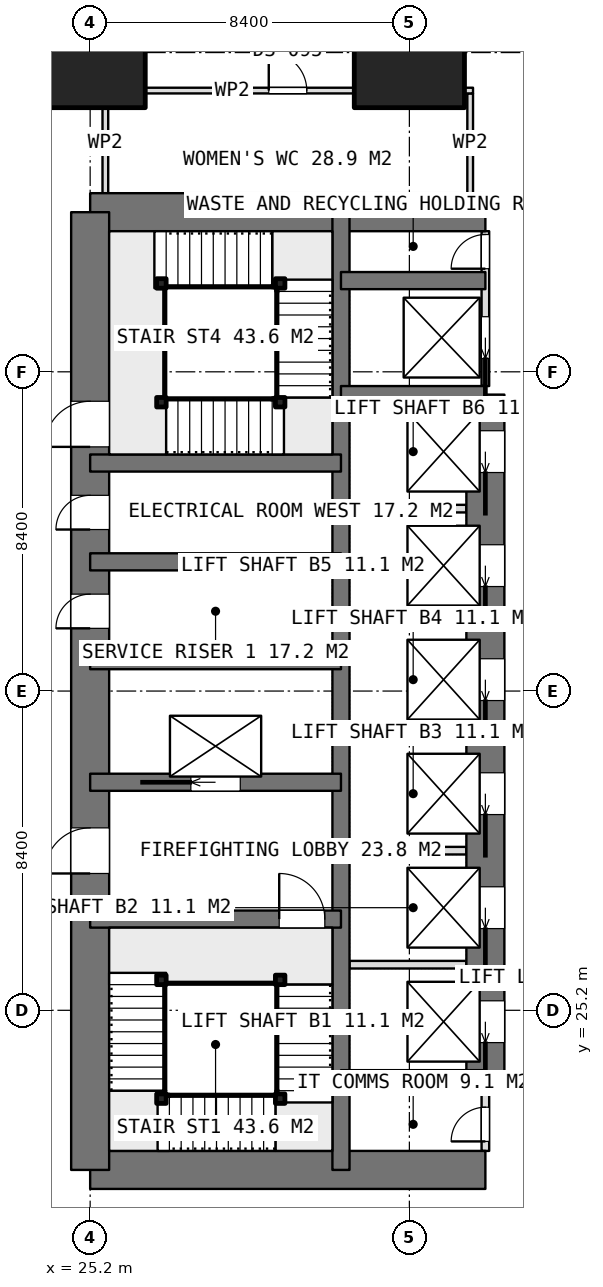
"""IFC4 building model, lengths in metres.
Left out: names, types, materials, properties, quantities, classifications, styles, units other than length and angle.
Written with IfcOpenShell. Run it as: python <this file> out.ifc"""

import sys

from ifc_helpers import new_model, si_unit, direction, frame, frame_2d, origin, origin_2d, place, context, subcontext, project, spatial, rectangle, extrude, element, fill, save


model = new_model("IFC4")
c1 = context("Model", 3, precision=1e-05, world=origin(), true_north=direction((0.0, 1.0)))
c2 = subcontext(c1, "Body", "Model", "MODEL_VIEW")
j1 = project(units=[si_unit("LENGTHUNIT", "METRE"), si_unit("PLANEANGLEUNIT", "RADIAN")], contexts=[c1])
p1 = place(None, origin())
s1 = spatial("IfcSite", under=j1, at=p1, CompositionType="ELEMENT")
p2 = place(p1, origin())
s2 = spatial("IfcBuilding", under=s1, at=p2, CompositionType="ELEMENT")
p3 = place(p2, frame((0.0, 0.0, 90.8)))
s3 = spatial("IfcBuildingStorey", under=s2, at=p3, CompositionType="ELEMENT", Elevation=90.8)
for number, where, z_axis, x_axis in (
    (1, (25.2, 21.0, 0.0), (0.0, 0.0, 1.0), (1.0, 0.0, 0.0)),
    (2, (25.2, 46.2, 0.0), (0.0, 0.0, 1.0), (1.0, 0.0, 0.0)),
):
    element("IfcWall", number, at=place(p3, frame(where, z_axis=z_axis, x_axis=x_axis)), inside=s3, PredefinedType="SHEAR", context=c2, shape_type="SweptSolid", body=[
        extrude(rectangle(XDim=10.4, YDim=1.0, at=frame_2d((5.2, 0.0))), origin(), (0.0, 0.0, 1.0), 4.5),
    ])
p4 = place(p3, frame((25.2, 21.0, 0.0), z_axis=(0.0, 0.0, 1.0), x_axis=(0.0, 1.0, 0.0)))
e3 = element("IfcWall", 3, at=p4, inside=s3, PredefinedType="SHEAR", context=c2, shape_type="SweptSolid", body=[
    extrude(rectangle(XDim=25.2, YDim=1.0, at=frame_2d((12.6, 0.0))), origin(), (0.0, 0.0, 1.0), 4.5),
])
p5 = place(p4, frame((7.8, 0.0, 0.0)))
e4 = element("IfcOpeningElement", 4, at=p5, cuts=e3, PredefinedType="OPENING", context=c2, shape_type="SweptSolid", body=[
    extrude(rectangle(XDim=1.2, YDim=2.1, at=frame_2d((0.6, 1.05))), frame((0.0, 0.51, 0.0), z_axis=(0.0, -1.0, 0.0), x_axis=(1.0, 0.0, 0.0)), (0.0, 0.0, 1.0), 1.02),
])
p6 = place(p4, frame((14.25, 0.0, 0.0)))
e5 = element("IfcOpeningElement", 5, at=p6, cuts=e3, PredefinedType="OPENING", context=c2, shape_type="SweptSolid", body=[
    extrude(rectangle(XDim=0.9, YDim=2.1, at=frame_2d((0.45, 1.05))), frame((0.0, 0.51, 0.0), z_axis=(0.0, -1.0, 0.0), x_axis=(1.0, 0.0, 0.0)), (0.0, 0.0, 1.0), 1.02),
])
p7 = place(p4, frame((16.85, 0.0, 0.0)))
e6 = element("IfcOpeningElement", 6, at=p7, cuts=e3, PredefinedType="OPENING", context=c2, shape_type="SweptSolid", body=[
    extrude(rectangle(XDim=0.9, YDim=2.1, at=frame_2d((0.45, 1.05))), frame((0.0, 0.51, 0.0), z_axis=(0.0, -1.0, 0.0), x_axis=(1.0, 0.0, 0.0)), (0.0, 0.0, 1.0), 1.02),
])
p8 = place(p4, frame((19.025, 0.0, 0.0)))
e7 = element("IfcOpeningElement", 7, at=p8, cuts=e3, PredefinedType="OPENING", context=c2, shape_type="SweptSolid", body=[
    extrude(rectangle(XDim=1.2, YDim=2.1, at=frame_2d((0.6, 1.05))), frame((0.0, 0.51, 0.0), z_axis=(0.0, -1.0, 0.0), x_axis=(1.0, 0.0, 0.0)), (0.0, 0.0, 1.0), 1.02),
])
p9 = place(p3, frame((31.8, 21.0, 0.0), z_axis=(0.0, 0.0, 1.0), x_axis=(0.0, 1.0, 0.0)))
e8 = element("IfcWall", 8, at=p9, inside=s3, PredefinedType="SHEAR", context=c2, shape_type="SweptSolid", body=[
    extrude(rectangle(XDim=25.2, YDim=0.45, at=frame_2d((12.6, 0.0))), origin(), (0.0, 0.0, 1.0), 4.5),
])
p10 = place(p3, frame((35.6, 23.4, 0.0), z_axis=(0.0, 0.0, 1.0), x_axis=(0.0, 1.0, 0.0)))
e9 = element("IfcWall", 9, at=p10, inside=s3, PredefinedType="SHEAR", context=c2, shape_type="SweptSolid", body=[
    extrude(rectangle(XDim=18.0, YDim=1.0, at=frame_2d((9.0, 0.0))), origin(), (0.0, 0.0, 1.0), 4.5),
])
p11 = place(p10, frame((0.95, 0.0, 0.0)))
e10 = element("IfcOpeningElement", 10, at=p11, cuts=e9, PredefinedType="OPENING", context=c2, shape_type="SweptSolid", body=[
    extrude(rectangle(XDim=1.1, YDim=2.1, at=frame_2d((0.55, 1.05))), frame((0.0, 0.51, 0.0), z_axis=(0.0, -1.0, 0.0), x_axis=(1.0, 0.0, 0.0)), (0.0, 0.0, 1.0), 1.02),
])
p12 = place(p10, frame((3.95, 0.0, 0.0)))
e11 = element("IfcOpeningElement", 11, at=p12, cuts=e9, PredefinedType="OPENING", context=c2, shape_type="SweptSolid", body=[
    extrude(rectangle(XDim=1.1, YDim=2.1, at=frame_2d((0.55, 1.05))), frame((0.0, 0.51, 0.0), z_axis=(0.0, -1.0, 0.0), x_axis=(1.0, 0.0, 0.0)), (0.0, 0.0, 1.0), 1.02),
])
p13 = place(p10, frame((6.95, 0.0, 0.0)))
e12 = element("IfcOpeningElement", 12, at=p13, cuts=e9, PredefinedType="OPENING", context=c2, shape_type="SweptSolid", body=[
    extrude(rectangle(XDim=1.1, YDim=2.1, at=frame_2d((0.55, 1.05))), frame((0.0, 0.51, 0.0), z_axis=(0.0, -1.0, 0.0), x_axis=(1.0, 0.0, 0.0)), (0.0, 0.0, 1.0), 1.02),
])
p14 = place(p10, frame((9.95, 0.0, 0.0)))
e13 = element("IfcOpeningElement", 13, at=p14, cuts=e9, PredefinedType="OPENING", context=c2, shape_type="SweptSolid", body=[
    extrude(rectangle(XDim=1.1, YDim=2.1, at=frame_2d((0.55, 1.05))), frame((0.0, 0.51, 0.0), z_axis=(0.0, -1.0, 0.0), x_axis=(1.0, 0.0, 0.0)), (0.0, 0.0, 1.0), 1.02),
])
p15 = place(p10, frame((12.95, 0.0, 0.0)))
e14 = element("IfcOpeningElement", 14, at=p15, cuts=e9, PredefinedType="OPENING", context=c2, shape_type="SweptSolid", body=[
    extrude(rectangle(XDim=1.1, YDim=2.1, at=frame_2d((0.55, 1.05))), frame((0.0, 0.51, 0.0), z_axis=(0.0, -1.0, 0.0), x_axis=(1.0, 0.0, 0.0)), (0.0, 0.0, 1.0), 1.02),
])
p16 = place(p10, frame((15.95, 0.0, 0.0)))
e15 = element("IfcOpeningElement", 15, at=p16, cuts=e9, PredefinedType="OPENING", context=c2, shape_type="SweptSolid", body=[
    extrude(rectangle(XDim=1.1, YDim=2.1, at=frame_2d((0.55, 1.05))), frame((0.0, 0.51, 0.0), z_axis=(0.0, -1.0, 0.0), x_axis=(1.0, 0.0, 0.0)), (0.0, 0.0, 1.0), 1.02),
])
for number, where, z_axis, x_axis in (
    (16, (31.8, 23.4, 0.0), (0.0, 0.0, 1.0), (1.0, 0.0, 0.0)),
    (17, (31.8, 41.4, 0.0), (0.0, 0.0, 1.0), (1.0, 0.0, 0.0)),
    (18, (31.8, 44.4, 0.0), (0.0, 0.0, 1.0), (1.0, 0.0, 0.0)),
):
    element("IfcWall", number, at=place(p3, frame(where, z_axis=z_axis, x_axis=x_axis)), inside=s3, PredefinedType="SHEAR", context=c2, shape_type="SweptSolid", body=[
        extrude(rectangle(XDim=3.8, YDim=0.45, at=frame_2d((1.9, 0.0))), origin(), (0.0, 0.0, 1.0), 4.5),
    ])
p17 = place(p3, frame((25.2, 27.6, 0.0), z_axis=(0.0, 0.0, 1.0), x_axis=(1.0, 0.0, 0.0)))
e19 = element("IfcWall", 19, at=p17, inside=s3, PredefinedType="SHEAR", context=c2, shape_type="SweptSolid", body=[
    extrude(rectangle(XDim=6.6, YDim=0.45, at=frame_2d((3.3, 0.0))), origin(), (0.0, 0.0, 1.0), 4.5),
])
p18 = place(p17, frame((4.975, 0.0, 0.0)))
e20 = element("IfcOpeningElement", 20, at=p18, cuts=e19, PredefinedType="OPENING", context=c2, shape_type="SweptSolid", body=[
    extrude(rectangle(XDim=1.2, YDim=2.1, at=frame_2d((0.6, 1.05))), frame((0.0, 0.235, 0.0), z_axis=(0.0, -1.0, 0.0), x_axis=(1.0, 0.0, 0.0)), (0.0, 0.0, 1.0), 0.47),
])
p19 = place(p3, frame((25.2, 31.2, 0.0), z_axis=(0.0, 0.0, 1.0), x_axis=(1.0, 0.0, 0.0)))
e21 = element("IfcWall", 21, at=p19, inside=s3, PredefinedType="SHEAR", context=c2, shape_type="SweptSolid", body=[
    extrude(rectangle(XDim=6.6, YDim=0.45, at=frame_2d((3.3, 0.0))), origin(), (0.0, 0.0, 1.0), 4.5),
])
p20 = place(p19, frame((2.65, 0.0, 0.0)))
e22 = element("IfcOpeningElement", 22, at=p20, cuts=e21, PredefinedType="OPENING", context=c2, shape_type="SweptSolid", body=[
    extrude(rectangle(XDim=1.3, YDim=2.1, at=frame_2d((0.65, 1.05))), frame((0.0, 0.235, 0.0), z_axis=(0.0, -1.0, 0.0), x_axis=(1.0, 0.0, 0.0)), (0.0, 0.0, 1.0), 0.47),
])
for number, where, z_axis, x_axis in (
    (23, (25.2, 34.4, 0.0), (0.0, 0.0, 1.0), (1.0, 0.0, 0.0)),
    (24, (25.2, 37.0, 0.0), (0.0, 0.0, 1.0), (1.0, 0.0, 0.0)),
    (25, (25.2, 39.6, 0.0), (0.0, 0.0, 1.0), (1.0, 0.0, 0.0)),
):
    element("IfcWall", number, at=place(p3, frame(where, z_axis=z_axis, x_axis=x_axis)), inside=s3, PredefinedType="SHEAR", context=c2, shape_type="SweptSolid", body=[
        extrude(rectangle(XDim=6.6, YDim=0.45, at=frame_2d((3.3, 0.0))), origin(), (0.0, 0.0, 1.0), 4.5),
    ])
for number, where, z_axis, x_axis in (
    (26, (25.2, 50.4, 0.0), (0.0, 0.0, 1.0), (1.0, 0.0, 0.0)),
    (27, (33.6, 50.4, 0.0), (0.0, 0.0, 1.0), (1.0, 0.0, 0.0)),
):
    element("IfcColumn", number, at=place(p3, frame(where, z_axis=z_axis, x_axis=x_axis)), inside=s3, PredefinedType="COLUMN", context=c2, shape_type="SweptSolid", body=[
        extrude(rectangle(XDim=2.9, YDim=2.9, at=origin_2d()), origin(), (0.0, 0.0, 1.0), 4.5),
    ])
for number, where, z_axis, x_axis in (
    (28, (32.025, 26.4, 0.0), (0.0, 0.0, 1.0), (1.0, 0.0, 0.0)),
    (29, (32.025, 29.4, 0.0), (0.0, 0.0, 1.0), (1.0, 0.0, 0.0)),
    (30, (32.025, 32.4, 0.0), (0.0, 0.0, 1.0), (1.0, 0.0, 0.0)),
    (31, (32.025, 35.4, 0.0), (0.0, 0.0, 1.0), (1.0, 0.0, 0.0)),
    (32, (32.025, 38.4, 0.0), (0.0, 0.0, 1.0), (1.0, 0.0, 0.0)),
):
    element("IfcWall", number, at=place(p3, frame(where, z_axis=z_axis, x_axis=x_axis)), inside=s3, PredefinedType="PARTITIONING", context=c2, shape_type="SweptSolid", body=[
        extrude(rectangle(XDim=3.075, YDim=0.2, at=frame_2d((1.538, 0.0))), origin(), (0.0, 0.0, 1.0), 4.25),
    ])
p21 = place(p3, frame((35.6, 41.625, 0.0), z_axis=(0.0, 0.0, 1.0), x_axis=(0.0, 1.0, 0.0)))
e33 = element("IfcWall", 33, at=p21, inside=s3, PredefinedType="PARTITIONING", context=c2, shape_type="SweptSolid", body=[
    extrude(rectangle(XDim=4.075, YDim=0.2, at=frame_2d((2.038, 0.0))), origin(), (0.0, 0.0, 1.0), 4.25),
])
p22 = place(p21, frame((3.088, 0.0, 0.0)))
e34 = element("IfcOpeningElement", 34, at=p22, cuts=e33, PredefinedType="OPENING", context=c2, shape_type="SweptSolid", body=[
    extrude(rectangle(XDim=0.9, YDim=2.1, at=frame_2d((0.45, 1.05))), frame((0.0, 0.11, 0.0), z_axis=(0.0, -1.0, 0.0), x_axis=(1.0, 0.0, 0.0)), (0.0, 0.0, 1.0), 0.22),
])
p23 = place(p21, frame((0.725, 0.0, 0.0)))
e35 = element("IfcOpeningElement", 35, at=p23, cuts=e33, PredefinedType="OPENING", context=c2, shape_type="SweptSolid", body=[
    extrude(rectangle(XDim=1.1, YDim=2.1, at=frame_2d((0.55, 1.05))), frame((0.0, 0.11, 0.0), z_axis=(0.0, -1.0, 0.0), x_axis=(1.0, 0.0, 0.0)), (0.0, 0.0, 1.0), 0.22),
])
p24 = place(p3, frame((35.6, 21.5, 0.0), z_axis=(0.0, 0.0, 1.0), x_axis=(0.0, 1.0, 0.0)))
e36 = element("IfcWall", 36, at=p24, inside=s3, PredefinedType="PARTITIONING", context=c2, shape_type="SweptSolid", body=[
    extrude(rectangle(XDim=1.675, YDim=0.2, at=frame_2d((0.837, 0.0))), origin(), (0.0, 0.0, 1.0), 4.25),
])
p25 = place(p24, frame((0.25, 0.0, 0.0)))
e37 = element("IfcOpeningElement", 37, at=p25, cuts=e36, PredefinedType="OPENING", context=c2, shape_type="SweptSolid", body=[
    extrude(rectangle(XDim=0.9, YDim=2.1, at=frame_2d((0.45, 1.05))), frame((0.0, 0.11, 0.0), z_axis=(0.0, -1.0, 0.0), x_axis=(1.0, 0.0, 0.0)), (0.0, 0.0, 1.0), 0.22),
])
p26 = place(p3, frame((25.525, 49.4, 0.0), z_axis=(0.0, 0.0, 1.0), x_axis=(1.0, 0.0, 0.0)))
e38 = element("IfcWall", 38, at=p26, inside=s3, PredefinedType="PARTITIONING", context=c2, shape_type="SweptSolid", body=[
    extrude(rectangle(XDim=9.75, YDim=0.15, at=frame_2d((4.875, 0.0))), origin(), (0.0, 0.0, 1.0), 4.25),
])
p27 = place(p26, frame((4.375, 0.0, 0.0)))
e39 = element("IfcOpeningElement", 39, at=p27, cuts=e38, PredefinedType="OPENING", context=c2, shape_type="SweptSolid", body=[
    extrude(rectangle(XDim=1.0, YDim=2.1, at=frame_2d((0.5, 1.05))), frame((0.0, 0.085, 0.0), z_axis=(0.0, -1.0, 0.0), x_axis=(1.0, 0.0, 0.0)), (0.0, 0.0, 1.0), 0.17),
])
for number, where, z_axis, x_axis in (
    (40, (25.6, 46.7, 0.0), (0.0, 0.0, 1.0), (0.0, 1.0, 0.0)),
    (41, (35.2, 46.7, 0.0), (0.0, 0.0, 1.0), (0.0, 1.0, 0.0)),
):
    element("IfcWall", number, at=place(p3, frame(where, z_axis=z_axis, x_axis=x_axis)), inside=s3, PredefinedType="PARTITIONING", context=c2, shape_type="SweptSolid", body=[
        extrude(rectangle(XDim=2.625, YDim=0.15, at=frame_2d((1.312, 0.0))), origin(), (0.0, 0.0, 1.0), 4.25),
    ])
for number, where, z_axis, x_axis in (
    (42, (30.2, 26.0, 0.0), (0.0, 0.0, 1.0), (1.0, 0.0, 0.0)),
    (43, (30.2, 22.875, 0.0), (0.0, 0.0, 1.0), (1.0, 0.0, 0.0)),
    (44, (27.075, 22.875, 0.0), (0.0, 0.0, 1.0), (1.0, 0.0, 0.0)),
    (45, (27.075, 26.0, 0.0), (0.0, 0.0, 1.0), (1.0, 0.0, 0.0)),
    (46, (27.075, 41.2, 0.0), (0.0, 0.0, 1.0), (1.0, 0.0, 0.0)),
    (47, (30.2, 41.2, 0.0), (0.0, 0.0, 1.0), (1.0, 0.0, 0.0)),
    (48, (30.2, 44.325, 0.0), (0.0, 0.0, 1.0), (1.0, 0.0, 0.0)),
    (49, (27.075, 44.325, 0.0), (0.0, 0.0, 1.0), (1.0, 0.0, 0.0)),
):
    element("IfcColumn", number, at=place(p3, frame(where, z_axis=z_axis, x_axis=x_axis)), inside=s3, PredefinedType="COLUMN", context=c2, shape_type="SweptSolid", body=[
        extrude(rectangle(XDim=0.25, YDim=0.25, at=origin_2d()), origin(), (0.0, 0.0, 1.0), 4.5),
    ])
p28 = place(p5, origin())
e50 = element("IfcDoor", 50, at=p28, inside=s3, OperationType="SINGLE_SWING_LEFT", PredefinedType="DOOR", context=c2, shape_type="SweptSolid", body=[
    extrude(rectangle(XDim=1.2, YDim=2.1, at=frame_2d((0.6, 1.05))), frame((0.0, 0.025, 0.0), z_axis=(0.0, -1.0, 0.0), x_axis=(1.0, 0.0, 0.0)), (0.0, 0.0, 1.0), 0.05),
])
fill(e4, e50)
p29 = place(p6, origin())
e51 = element("IfcDoor", 51, at=p29, inside=s3, OperationType="SINGLE_SWING_LEFT", PredefinedType="DOOR", context=c2, shape_type="SweptSolid", body=[
    extrude(rectangle(XDim=0.9, YDim=2.1, at=frame_2d((0.45, 1.05))), frame((0.0, 0.025, 0.0), z_axis=(0.0, -1.0, 0.0), x_axis=(1.0, 0.0, 0.0)), (0.0, 0.0, 1.0), 0.05),
])
fill(e5, e51)
p30 = place(p7, origin())
e52 = element("IfcDoor", 52, at=p30, inside=s3, OperationType="SINGLE_SWING_LEFT", PredefinedType="DOOR", context=c2, shape_type="SweptSolid", body=[
    extrude(rectangle(XDim=0.9, YDim=2.1, at=frame_2d((0.45, 1.05))), frame((0.0, 0.025, 0.0), z_axis=(0.0, -1.0, 0.0), x_axis=(1.0, 0.0, 0.0)), (0.0, 0.0, 1.0), 0.05),
])
fill(e6, e52)
p31 = place(p25, origin())
e53 = element("IfcDoor", 53, at=p31, inside=s3, OperationType="SINGLE_SWING_LEFT", PredefinedType="DOOR", context=c2, shape_type="SweptSolid", body=[
    extrude(rectangle(XDim=0.9, YDim=2.1, at=frame_2d((0.45, 1.05))), frame((0.0, 0.025, 0.0), z_axis=(0.0, -1.0, 0.0), x_axis=(1.0, 0.0, 0.0)), (0.0, 0.0, 1.0), 0.05),
])
fill(e37, e53)
p32 = place(p22, origin())
e54 = element("IfcDoor", 54, at=p32, inside=s3, OperationType="SINGLE_SWING_LEFT", PredefinedType="DOOR", context=c2, shape_type="SweptSolid", body=[
    extrude(rectangle(XDim=0.9, YDim=2.1, at=frame_2d((0.45, 1.05))), frame((0.0, 0.025, 0.0), z_axis=(0.0, -1.0, 0.0), x_axis=(1.0, 0.0, 0.0)), (0.0, 0.0, 1.0), 0.05),
])
fill(e34, e54)
p33 = place(p11, origin())
e55 = element("IfcDoor", 55, at=p33, inside=s3, OperationType="SLIDING_TO_LEFT", PredefinedType="USERDEFINED", context=c2, shape_type="SweptSolid", body=[
    extrude(rectangle(XDim=1.1, YDim=2.1, at=frame_2d((0.55, 1.05))), frame((0.0, 0.025, 0.0), z_axis=(0.0, -1.0, 0.0), x_axis=(1.0, 0.0, 0.0)), (0.0, 0.0, 1.0), 0.05),
])
fill(e10, e55)
p34 = place(p12, origin())
e56 = element("IfcDoor", 56, at=p34, inside=s3, OperationType="SLIDING_TO_LEFT", PredefinedType="USERDEFINED", context=c2, shape_type="SweptSolid", body=[
    extrude(rectangle(XDim=1.1, YDim=2.1, at=frame_2d((0.55, 1.05))), frame((0.0, 0.025, 0.0), z_axis=(0.0, -1.0, 0.0), x_axis=(1.0, 0.0, 0.0)), (0.0, 0.0, 1.0), 0.05),
])
fill(e11, e56)
p35 = place(p13, origin())
e57 = element("IfcDoor", 57, at=p35, inside=s3, OperationType="SLIDING_TO_LEFT", PredefinedType="USERDEFINED", context=c2, shape_type="SweptSolid", body=[
    extrude(rectangle(XDim=1.1, YDim=2.1, at=frame_2d((0.55, 1.05))), frame((0.0, 0.025, 0.0), z_axis=(0.0, -1.0, 0.0), x_axis=(1.0, 0.0, 0.0)), (0.0, 0.0, 1.0), 0.05),
])
fill(e12, e57)
p36 = place(p14, origin())
e58 = element("IfcDoor", 58, at=p36, inside=s3, OperationType="SLIDING_TO_LEFT", PredefinedType="USERDEFINED", context=c2, shape_type="SweptSolid", body=[
    extrude(rectangle(XDim=1.1, YDim=2.1, at=frame_2d((0.55, 1.05))), frame((0.0, 0.025, 0.0), z_axis=(0.0, -1.0, 0.0), x_axis=(1.0, 0.0, 0.0)), (0.0, 0.0, 1.0), 0.05),
])
fill(e13, e58)
p37 = place(p15, origin())
e59 = element("IfcDoor", 59, at=p37, inside=s3, OperationType="SLIDING_TO_LEFT", PredefinedType="USERDEFINED", context=c2, shape_type="SweptSolid", body=[
    extrude(rectangle(XDim=1.1, YDim=2.1, at=frame_2d((0.55, 1.05))), frame((0.0, 0.025, 0.0), z_axis=(0.0, -1.0, 0.0), x_axis=(1.0, 0.0, 0.0)), (0.0, 0.0, 1.0), 0.05),
])
fill(e14, e59)
p38 = place(p16, origin())
e60 = element("IfcDoor", 60, at=p38, inside=s3, OperationType="SLIDING_TO_LEFT", PredefinedType="USERDEFINED", context=c2, shape_type="SweptSolid", body=[
    extrude(rectangle(XDim=1.1, YDim=2.1, at=frame_2d((0.55, 1.05))), frame((0.0, 0.025, 0.0), z_axis=(0.0, -1.0, 0.0), x_axis=(1.0, 0.0, 0.0)), (0.0, 0.0, 1.0), 0.05),
])
fill(e15, e60)
p39 = place(p20, origin())
e61 = element("IfcDoor", 61, at=p39, inside=s3, OperationType="SLIDING_TO_LEFT", PredefinedType="USERDEFINED", context=c2, shape_type="SweptSolid", body=[
    extrude(rectangle(XDim=1.3, YDim=2.1, at=frame_2d((0.65, 1.05))), frame((0.0, 0.025, 0.0), z_axis=(0.0, -1.0, 0.0), x_axis=(1.0, 0.0, 0.0)), (0.0, 0.0, 1.0), 0.05),
])
fill(e22, e61)
p40 = place(p23, origin())
e62 = element("IfcDoor", 62, at=p40, inside=s3, OperationType="SLIDING_TO_LEFT", PredefinedType="USERDEFINED", context=c2, shape_type="SweptSolid", body=[
    extrude(rectangle(XDim=1.1, YDim=2.1, at=frame_2d((0.55, 1.05))), frame((0.0, 0.025, 0.0), z_axis=(0.0, -1.0, 0.0), x_axis=(1.0, 0.0, 0.0)), (0.0, 0.0, 1.0), 0.05),
])
fill(e35, e62)
p41 = place(p27, origin())
e63 = element("IfcDoor", 63, at=p41, inside=s3, OperationType="SINGLE_SWING_LEFT", PredefinedType="DOOR", context=c2, shape_type="SweptSolid", body=[
    extrude(rectangle(XDim=1.0, YDim=2.1, at=frame_2d((0.5, 1.05))), frame((0.0, 0.025, 0.0), z_axis=(0.0, -1.0, 0.0), x_axis=(1.0, 0.0, 0.0)), (0.0, 0.0, 1.0), 0.05),
])
fill(e39, e63)
p42 = place(p18, origin())
e64 = element("IfcDoor", 64, at=p42, inside=s3, OperationType="SINGLE_SWING_RIGHT", PredefinedType="DOOR", context=c2, shape_type="SweptSolid", body=[
    extrude(rectangle(XDim=1.2, YDim=2.1, at=frame_2d((0.6, 1.05))), frame((0.0, 0.025, 0.0), z_axis=(0.0, -1.0, 0.0), x_axis=(1.0, 0.0, 0.0)), (0.0, 0.0, 1.0), 0.05),
])
fill(e20, e64)
p43 = place(p8, origin())
e65 = element("IfcDoor", 65, at=p43, inside=s3, OperationType="SINGLE_SWING_RIGHT", PredefinedType="DOOR", context=c2, shape_type="SweptSolid", body=[
    extrude(rectangle(XDim=1.2, YDim=2.1, at=frame_2d((0.6, 1.05))), frame((0.0, 0.025, 0.0), z_axis=(0.0, -1.0, 0.0), x_axis=(1.0, 0.0, 0.0)), (0.0, 0.0, 1.0), 0.05),
])
fill(e7, e65)
save(model, sys.argv[1])
